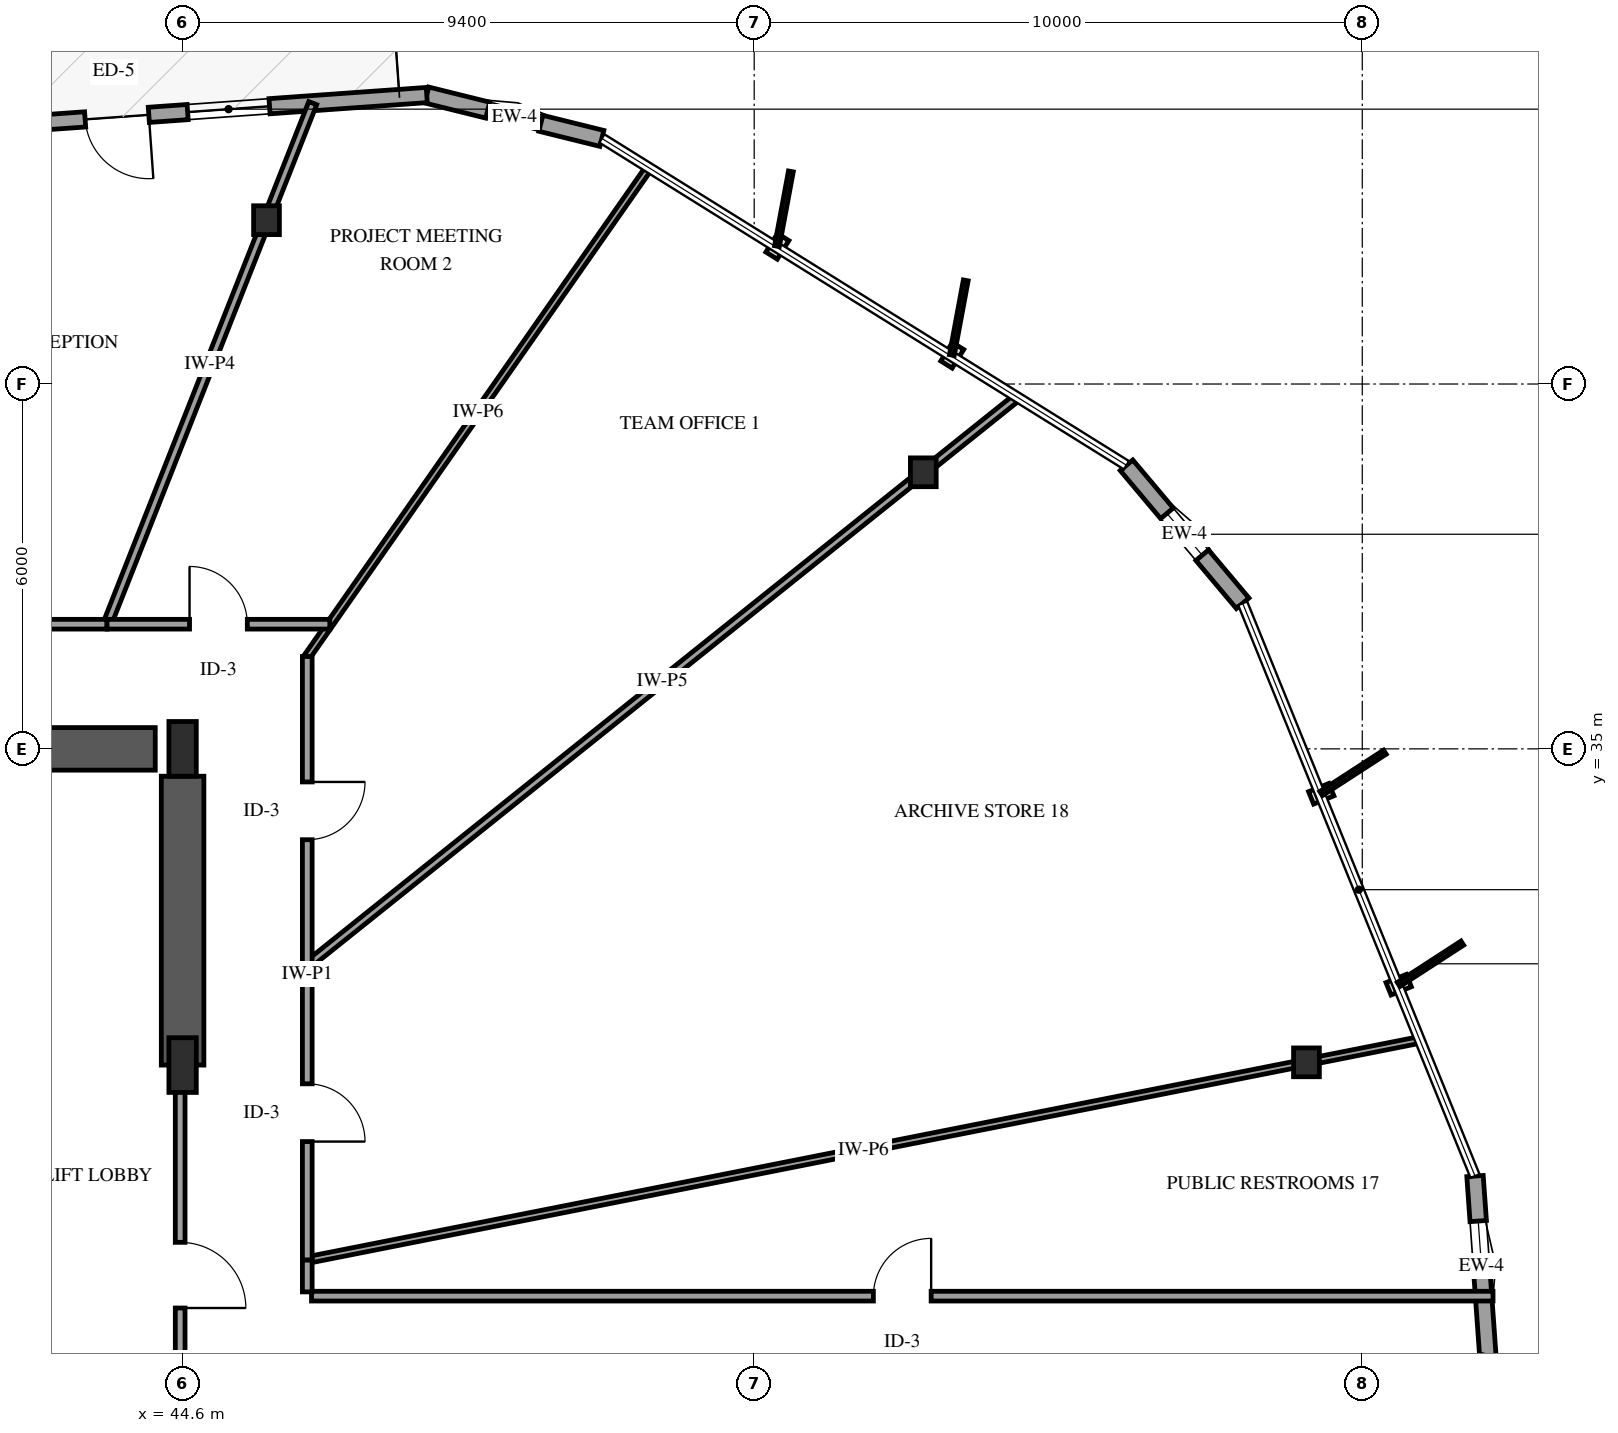
"""IFC4 building model, lengths in metres.
Left out: names, types, materials, properties, quantities, classifications, styles, units other than length and angle.
Written with IfcOpenShell. Run it as: python <this file> out.ifc"""

import sys

from ifc_helpers import new_model, si_unit, direction, frame, frame_2d, origin, origin_2d, place, context, subcontext, project, spatial, rectangle, i_section, extrude, element, fill, save


model = new_model("IFC4")
c1 = context("Model", 3, precision=1e-05, world=origin(), true_north=direction((0.0, 1.0)))
c2 = subcontext(c1, "Body", "Model", "MODEL_VIEW")
j1 = project(units=[si_unit("LENGTHUNIT", "METRE"), si_unit("PLANEANGLEUNIT", "RADIAN")], contexts=[c1])
p1 = place(None, origin())
s1 = spatial("IfcSite", under=j1, at=p1, CompositionType="ELEMENT")
p2 = place(p1, origin())
s2 = spatial("IfcBuilding", under=s1, at=p2, CompositionType="ELEMENT")
p3 = place(p2, frame((0.0, 0.0, 42.6)))
s3 = spatial("IfcBuildingStorey", under=s2, at=p3, CompositionType="ELEMENT", Elevation=42.6)
p4 = place(p3, frame((41.3, 35.0, 0.0), z_axis=(0.0, 0.0, 1.0), x_axis=(1.0, 0.0, 0.0)))
e1 = element("IfcWall", 1, at=p4, inside=s3, PredefinedType="SHEAR", context=c2, shape_type="SweptSolid", body=[
    extrude(rectangle(XDim=2.85, YDim=0.7, at=frame_2d((1.425, 0.0))), origin(), (0.0, 0.0, 1.0), 4.0),
])
p5 = place(p3, frame((44.6, 29.8, 0.0), z_axis=(0.0, 0.0, 1.0), x_axis=(0.0, 1.0, 0.0)))
e2 = element("IfcWall", 2, at=p5, inside=s3, PredefinedType="SHEAR", context=c2, shape_type="SweptSolid", body=[
    extrude(rectangle(XDim=4.75, YDim=0.7, at=frame_2d((2.375, 0.0))), origin(), (0.0, 0.0, 1.0), 4.0),
])
for number, where, z_axis, x_axis in (
    (3, (44.6, 29.8, 0.0), (0.0, 0.0, 1.0), (1.0, 0.0, 0.0)),
    (4, (44.6, 35.0, 0.0), (0.0, 0.0, 1.0), (1.0, 0.0, 0.0)),
):
    element("IfcColumn", number, at=place(p3, frame(where, z_axis=z_axis, x_axis=x_axis)), inside=s3, PredefinedType="PILASTER", context=c2, shape_type="SweptSolid", body=[
        extrude(rectangle(XDim=0.45, YDim=0.9, at=origin_2d()), origin(), (0.0, 0.0, 1.0), 4.0),
    ])
for number, where, z_axis, x_axis in (
    (5, (63.082, 29.845, 0.0), (0.0, 0.0, 1.0), (1.0, 0.0, 0.0)),
    (6, (56.781, 39.548, 0.0), (0.0, 0.0, 1.0), (1.0, 0.0, 0.0)),
    (7, (45.98, 43.694, 0.0), (0.0, 0.0, 1.0), (1.0, 0.0, 0.0)),
):
    element("IfcColumn", number, at=place(p3, frame(where, z_axis=z_axis, x_axis=x_axis)), inside=s3, PredefinedType="COLUMN", context=c2, shape_type="SweptSolid", body=[
        extrude(i_section(OverallWidth=0.424, OverallDepth=0.474, WebThickness=0.048, FlangeThickness=0.077, FilletRadius=0.038, at=origin_2d()), origin(), (0.0, 0.0, 1.0), 4.0),
    ])
p6 = place(p3, frame((62.033, 37.394, 0.0), z_axis=(0.0, 0.0, 1.0), x_axis=(-0.643844242511, 0.765156579653, 0.0)))
e8 = element("IfcWall", 8, at=p6, inside=s3, PredefinedType="SOLIDWALL", context=c2, shape_type="SweptSolid", body=[
    extrude(rectangle(XDim=2.966, YDim=0.27, at=frame_2d((1.483, 0.0))), origin(), (0.0, 0.0, 1.0), 3.079),
])
p7 = place(p6, frame((1.033, 0.0, 0.75)))
e9 = element("IfcOpeningElement", 9, at=p7, cuts=e8, PredefinedType="OPENING", context=c2, shape_type="SweptSolid", body=[
    extrude(rectangle(XDim=0.9, YDim=1.5, at=frame_2d((0.45, 0.75))), frame((0.0, 0.145, 0.0), z_axis=(0.0, -1.0, 0.0), x_axis=(1.0, 0.0, 0.0)), (0.0, 0.0, 1.0), 0.29),
])
p8 = place(p3, frame((51.495, 45.039, 0.0), z_axis=(0.0, 0.0, 1.0), x_axis=(-0.970634283387, 0.240559946612, 0.0)))
e10 = element("IfcWall", 10, at=p8, inside=s3, PredefinedType="SOLIDWALL", context=c2, shape_type="SweptSolid", body=[
    extrude(rectangle(XDim=2.967, YDim=0.27, at=frame_2d((1.483, 0.0))), origin(), (0.0, 0.0, 1.0), 3.079),
])
p9 = place(p8, frame((1.033, 0.0, 0.75)))
e11 = element("IfcOpeningElement", 11, at=p9, cuts=e10, PredefinedType="OPENING", context=c2, shape_type="SweptSolid", body=[
    extrude(rectangle(XDim=0.9, YDim=1.5, at=frame_2d((0.45, 0.75))), frame((0.0, 0.145, 0.0), z_axis=(0.0, -1.0, 0.0), x_axis=(1.0, 0.0, 0.0)), (0.0, 0.0, 1.0), 0.29),
])
p10 = place(p3, frame((48.615, 45.752, 0.0), z_axis=(0.0, 0.0, 1.0), x_axis=(-0.997466374724, -0.071139519923, 0.0)))
e12 = element("IfcWall", 12, at=p10, inside=s3, PredefinedType="SOLIDWALL", context=c2, shape_type="SweptSolid", body=[
    extrude(rectangle(XDim=10.165, YDim=0.25, at=frame_2d((5.083, 0.0))), origin(), (0.0, 0.0, 1.0), 3.079),
])
p11 = place(p10, frame((4.583, 0.0, 0.0)))
e13 = element("IfcOpeningElement", 13, at=p11, cuts=e12, PredefinedType="OPENING", context=c2, shape_type="SweptSolid", body=[
    extrude(rectangle(XDim=1.05, YDim=2.15, at=frame_2d((0.525, 1.075))), frame((0.0, 0.135, 0.0), z_axis=(0.0, -1.0, 0.0), x_axis=(1.0, 0.0, 0.0)), (0.0, 0.0, 1.0), 0.27),
])
p12 = place(p10, frame((2.593, 0.0, 0.72)))
e14 = element("IfcOpeningElement", 14, at=p12, cuts=e12, PredefinedType="OPENING", context=c2, shape_type="SweptSolid", body=[
    extrude(rectangle(XDim=1.35, YDim=1.65, at=frame_2d((0.675, 0.825))), frame((0.0, 0.135, 0.0), z_axis=(0.0, -1.0, 0.0), x_axis=(1.0, 0.0, 0.0)), (0.0, 0.0, 1.0), 0.27),
])
p13 = place(p10, frame((6.273, 0.0, 0.72)))
e15 = element("IfcOpeningElement", 15, at=p13, cuts=e12, PredefinedType="OPENING", context=c2, shape_type="SweptSolid", body=[
    extrude(rectangle(XDim=1.35, YDim=1.65, at=frame_2d((0.675, 0.825))), frame((0.0, 0.135, 0.0), z_axis=(0.0, -1.0, 0.0), x_axis=(1.0, 0.0, 0.0)), (0.0, 0.0, 1.0), 0.27),
])
p14 = place(p3, frame((66.065, 25.015, 0.0), z_axis=(0.0, 0.0, 1.0), x_axis=(-0.071100844018, 0.997469132344, 0.0)))
e16 = element("IfcWall", 16, at=p14, inside=s3, PredefinedType="SOLIDWALL", context=c2, shape_type="SweptSolid", body=[
    extrude(rectangle(XDim=2.967, YDim=0.27, at=frame_2d((1.483, 0.0))), origin(), (0.0, 0.0, 1.0), 3.079),
])
p15 = place(p14, frame((1.325, 0.0, 0.75)))
e17 = element("IfcOpeningElement", 17, at=p15, cuts=e16, PredefinedType="OPENING", context=c2, shape_type="SweptSolid", body=[
    extrude(rectangle(XDim=0.9, YDim=1.5, at=frame_2d((0.45, 0.75))), frame((0.0, 0.145, 0.0), z_axis=(0.0, -1.0, 0.0), x_axis=(1.0, 0.0, 0.0)), (0.0, 0.0, 1.0), 0.29),
])
p16 = place(p3, frame((46.72, 26.0, 0.0), z_axis=(0.0, 0.0, 1.0), x_axis=(1.0, 0.0, 0.0)))
e18 = element("IfcWall", 18, at=p16, inside=s3, PredefinedType="PARTITIONING", context=c2, shape_type="SweptSolid", body=[
    extrude(rectangle(XDim=19.43, YDim=0.16, at=frame_2d((9.715, 0.0))), origin(), (0.0, 0.0, 1.0), 3.7),
])
p17 = place(p16, frame((9.24, 0.0, 0.0)))
e19 = element("IfcOpeningElement", 19, at=p17, cuts=e18, PredefinedType="OPENING", context=c2, shape_type="SweptSolid", body=[
    extrude(rectangle(XDim=0.95, YDim=2.15, at=frame_2d((0.475, 1.075))), frame((0.0, 0.09, 0.0), z_axis=(0.0, -1.0, 0.0), x_axis=(1.0, 0.0, 0.0)), (0.0, 0.0, 1.0), 0.18),
])
p18 = place(p3, frame((46.65, 26.593, 0.0), z_axis=(0.0, 0.0, 1.0), x_axis=(0.98097190597, 0.19414973525, 0.0)))
e20 = element("IfcWall", 20, at=p18, inside=s3, PredefinedType="PARTITIONING", context=c2, shape_type="SweptSolid", body=[
    extrude(rectangle(XDim=18.651, YDim=0.11, at=frame_2d((9.326, 0.0))), origin(), (0.0, 0.0, 1.0), 2.995),
])
p19 = place(p3, frame((46.65, 31.442, 0.0), z_axis=(0.0, 0.0, 1.0), x_axis=(0.780828986404, 0.6247448231, 0.0)))
e21 = element("IfcWall", 21, at=p19, inside=s3, PredefinedType="PARTITIONING", context=c2, shape_type="SweptSolid", body=[
    extrude(rectangle(XDim=14.953, YDim=0.13, at=frame_2d((7.477, 0.0))), origin(), (0.0, 0.0, 1.0), 3.7),
])
p20 = place(p3, frame((46.65, 36.519, 0.0), z_axis=(0.0, 0.0, 1.0), x_axis=(0.572892452381, 0.819630549702, 0.0)))
e22 = element("IfcWall", 22, at=p20, inside=s3, PredefinedType="PARTITIONING", context=c2, shape_type="SweptSolid", body=[
    extrude(rectangle(XDim=9.807, YDim=0.11, at=frame_2d((4.903, 0.0))), origin(), (0.0, 0.0, 1.0), 3.7),
])
p21 = place(p3, frame((43.357, 37.05, 0.0), z_axis=(0.0, 0.0, 1.0), x_axis=(0.367224458335, 0.930132354668, 0.0)))
e23 = element("IfcWall", 23, at=p21, inside=s3, PredefinedType="PARTITIONING", context=c2, shape_type="SweptSolid", body=[
    extrude(rectangle(XDim=9.212, YDim=0.14, at=frame_2d((4.606, 0.0))), origin(), (0.0, 0.0, 1.0), 2.995),
])
p22 = place(p3, frame((44.56, 29.8, 0.0), z_axis=(0.0, 0.0, 1.0), x_axis=(0.0, -1.0, 0.0)))
e24 = element("IfcWall", 24, at=p22, inside=s3, PredefinedType="PARTITIONING", context=c2, shape_type="SweptSolid", body=[
    extrude(rectangle(XDim=6.91, YDim=0.16, at=frame_2d((3.455, 0.0))), origin(), (0.0, 0.0, 1.0), 2.74),
])
p23 = place(p22, frame((2.915, 0.0, 0.0)))
e25 = element("IfcOpeningElement", 25, at=p23, cuts=e24, PredefinedType="OPENING", context=c2, shape_type="SweptSolid", body=[
    extrude(rectangle(XDim=1.08, YDim=2.15, at=frame_2d((0.54, 1.075))), frame((0.0, 0.09, 0.0), z_axis=(0.0, -1.0, 0.0), x_axis=(1.0, 0.0, 0.0)), (0.0, 0.0, 1.0), 0.18),
])
p24 = place(p3, frame((46.65, 36.519, 0.0), z_axis=(0.0, 0.0, 1.0), x_axis=(0.0, -1.0, 0.0)))
e26 = element("IfcWall", 26, at=p24, inside=s3, PredefinedType="PARTITIONING", context=c2, shape_type="SweptSolid", body=[
    extrude(rectangle(XDim=5.077, YDim=0.16, at=frame_2d((2.539, 0.0))), origin(), (0.0, 0.0, 1.0), 3.7),
])
p25 = place(p24, frame((2.063, 0.0, 0.0)))
e27 = element("IfcOpeningElement", 27, at=p25, cuts=e26, PredefinedType="OPENING", context=c2, shape_type="SweptSolid", body=[
    extrude(rectangle(XDim=0.95, YDim=2.15, at=frame_2d((0.475, 1.075))), frame((0.0, 0.09, 0.0), z_axis=(0.0, -1.0, 0.0), x_axis=(1.0, 0.0, 0.0)), (0.0, 0.0, 1.0), 0.18),
])
p26 = place(p3, frame((46.65, 31.442, 0.0), z_axis=(0.0, 0.0, 1.0), x_axis=(0.0, -1.0, 0.0)))
e28 = element("IfcWall", 28, at=p26, inside=s3, PredefinedType="PARTITIONING", context=c2, shape_type="SweptSolid", body=[
    extrude(rectangle(XDim=4.849, YDim=0.16, at=frame_2d((2.424, 0.0))), origin(), (0.0, 0.0, 1.0), 3.7),
])
p27 = place(p26, frame((1.95, 0.0, 0.0)))
e29 = element("IfcOpeningElement", 29, at=p27, cuts=e28, PredefinedType="OPENING", context=c2, shape_type="SweptSolid", body=[
    extrude(rectangle(XDim=0.95, YDim=2.15, at=frame_2d((0.475, 1.075))), frame((0.0, 0.09, 0.0), z_axis=(0.0, -1.0, 0.0), x_axis=(1.0, 0.0, 0.0)), (0.0, 0.0, 1.0), 0.18),
])
p28 = place(p3, frame((39.067, 37.05, 0.0), z_axis=(0.0, 0.0, 1.0), x_axis=(1.0, 0.0, 0.0)))
e30 = element("IfcWall", 30, at=p28, inside=s3, PredefinedType="PARTITIONING", context=c2, shape_type="SweptSolid", body=[
    extrude(rectangle(XDim=4.29, YDim=0.16, at=frame_2d((2.145, 0.0))), origin(), (0.0, 0.0, 1.0), 3.7),
])
p29 = place(p28, frame((1.67, 0.0, 0.0)))
e31 = element("IfcOpeningElement", 31, at=p29, cuts=e30, PredefinedType="OPENING", context=c2, shape_type="SweptSolid", body=[
    extrude(rectangle(XDim=0.95, YDim=2.15, at=frame_2d((0.475, 1.075))), frame((0.0, 0.09, 0.0), z_axis=(0.0, -1.0, 0.0), x_axis=(1.0, 0.0, 0.0)), (0.0, 0.0, 1.0), 0.18),
])
p30 = place(p3, frame((43.357, 37.05, 0.0), z_axis=(0.0, 0.0, 1.0), x_axis=(1.0, 0.0, 0.0)))
e32 = element("IfcWall", 32, at=p30, inside=s3, PredefinedType="PARTITIONING", context=c2, shape_type="SweptSolid", body=[
    extrude(rectangle(XDim=3.664, YDim=0.16, at=frame_2d((1.832, 0.0))), origin(), (0.0, 0.0, 1.0), 3.7),
])
p31 = place(p30, frame((1.357, 0.0, 0.0)))
e33 = element("IfcOpeningElement", 33, at=p31, cuts=e32, PredefinedType="OPENING", context=c2, shape_type="SweptSolid", body=[
    extrude(rectangle(XDim=0.95, YDim=2.15, at=frame_2d((0.475, 1.075))), frame((0.0, 0.09, 0.0), z_axis=(0.0, -1.0, 0.0), x_axis=(1.0, 0.0, 0.0)), (0.0, 0.0, 1.0), 0.18),
])
p32 = place(p3, frame((46.65, 26.593, 0.0), z_axis=(0.0, 0.0, 1.0), x_axis=(0.0, -1.0, 0.0)))
e34 = element("IfcWall", 34, at=p32, inside=s3, PredefinedType="PARTITIONING", context=c2, shape_type="SweptSolid", body=[
    extrude(rectangle(XDim=0.523, YDim=0.16, at=frame_2d((0.261, 0.0))), origin(), (0.0, 0.0, 1.0), 3.7),
])
p33 = place(p7, origin())
e35 = element("IfcWindow", 35, at=p33, inside=s3, PartitioningType="SINGLE_PANEL", PredefinedType="WINDOW", context=c2, shape_type="SweptSolid", body=[
    extrude(rectangle(XDim=0.9, YDim=1.5, at=frame_2d((0.45, 0.75))), frame((0.0, 0.03, 0.0), z_axis=(0.0, -1.0, 0.0), x_axis=(1.0, 0.0, 0.0)), (0.0, 0.0, 1.0), 0.06),
])
fill(e9, e35)
p34 = place(p9, origin())
e36 = element("IfcWindow", 36, at=p34, inside=s3, PartitioningType="SINGLE_PANEL", PredefinedType="WINDOW", context=c2, shape_type="SweptSolid", body=[
    extrude(rectangle(XDim=0.9, YDim=1.5, at=frame_2d((0.45, 0.75))), frame((0.0, 0.03, 0.0), z_axis=(0.0, -1.0, 0.0), x_axis=(1.0, 0.0, 0.0)), (0.0, 0.0, 1.0), 0.06),
])
fill(e11, e36)
p35 = place(p11, origin())
e37 = element("IfcDoor", 37, at=p35, inside=s3, OperationType="SINGLE_SWING_LEFT", PredefinedType="DOOR", context=c2, shape_type="SweptSolid", body=[
    extrude(rectangle(XDim=1.05, YDim=2.15, at=frame_2d((0.525, 1.075))), frame((0.0, 0.025, 0.0), z_axis=(0.0, -1.0, 0.0), x_axis=(1.0, 0.0, 0.0)), (0.0, 0.0, 1.0), 0.05),
])
fill(e13, e37)
p36 = place(p12, origin())
e38 = element("IfcWindow", 38, at=p36, inside=s3, PartitioningType="SINGLE_PANEL", PredefinedType="WINDOW", context=c2, shape_type="SweptSolid", body=[
    extrude(rectangle(XDim=1.35, YDim=1.65, at=frame_2d((0.675, 0.825))), frame((0.0, 0.03, 0.0), z_axis=(0.0, -1.0, 0.0), x_axis=(1.0, 0.0, 0.0)), (0.0, 0.0, 1.0), 0.06),
])
fill(e14, e38)
p37 = place(p15, origin())
e39 = element("IfcWindow", 39, at=p37, inside=s3, PartitioningType="SINGLE_PANEL", PredefinedType="WINDOW", context=c2, shape_type="SweptSolid", body=[
    extrude(rectangle(XDim=0.9, YDim=1.5, at=frame_2d((0.45, 0.75))), frame((0.0, 0.03, 0.0), z_axis=(0.0, -1.0, 0.0), x_axis=(1.0, 0.0, 0.0)), (0.0, 0.0, 1.0), 0.06),
])
fill(e17, e39)
p38 = place(p17, origin())
e40 = element("IfcDoor", 40, at=p38, inside=s3, OperationType="SINGLE_SWING_RIGHT", PredefinedType="DOOR", context=c2, shape_type="SweptSolid", body=[
    extrude(rectangle(XDim=0.95, YDim=2.15, at=frame_2d((0.475, 1.075))), frame((0.0, 0.025, 0.0), z_axis=(0.0, -1.0, 0.0), x_axis=(1.0, 0.0, 0.0)), (0.0, 0.0, 1.0), 0.05),
])
fill(e19, e40)
p39 = place(p23, origin())
e41 = element("IfcDoor", 41, at=p39, inside=s3, OperationType="SINGLE_SWING_RIGHT", PredefinedType="DOOR", context=c2, shape_type="SweptSolid", body=[
    extrude(rectangle(XDim=1.08, YDim=2.15, at=frame_2d((0.54, 1.075))), frame((0.0, 0.025, 0.0), z_axis=(0.0, -1.0, 0.0), x_axis=(1.0, 0.0, 0.0)), (0.0, 0.0, 1.0), 0.05),
])
fill(e25, e41)
p40 = place(p25, origin())
e42 = element("IfcDoor", 42, at=p40, inside=s3, OperationType="SINGLE_SWING_LEFT", PredefinedType="DOOR", context=c2, shape_type="SweptSolid", body=[
    extrude(rectangle(XDim=0.95, YDim=2.15, at=frame_2d((0.475, 1.075))), frame((0.0, 0.025, 0.0), z_axis=(0.0, -1.0, 0.0), x_axis=(1.0, 0.0, 0.0)), (0.0, 0.0, 1.0), 0.05),
])
fill(e27, e42)
p41 = place(p27, origin())
e43 = element("IfcDoor", 43, at=p41, inside=s3, OperationType="SINGLE_SWING_RIGHT", PredefinedType="DOOR", context=c2, shape_type="SweptSolid", body=[
    extrude(rectangle(XDim=0.95, YDim=2.15, at=frame_2d((0.475, 1.075))), frame((0.0, 0.025, 0.0), z_axis=(0.0, -1.0, 0.0), x_axis=(1.0, 0.0, 0.0)), (0.0, 0.0, 1.0), 0.05),
])
fill(e29, e43)
p42 = place(p31, origin())
e44 = element("IfcDoor", 44, at=p42, inside=s3, OperationType="SINGLE_SWING_LEFT", PredefinedType="DOOR", context=c2, shape_type="SweptSolid", body=[
    extrude(rectangle(XDim=0.95, YDim=2.15, at=frame_2d((0.475, 1.075))), frame((0.0, 0.025, 0.0), z_axis=(0.0, -1.0, 0.0), x_axis=(1.0, 0.0, 0.0)), (0.0, 0.0, 1.0), 0.05),
])
fill(e33, e44)
save(model, sys.argv[1])
